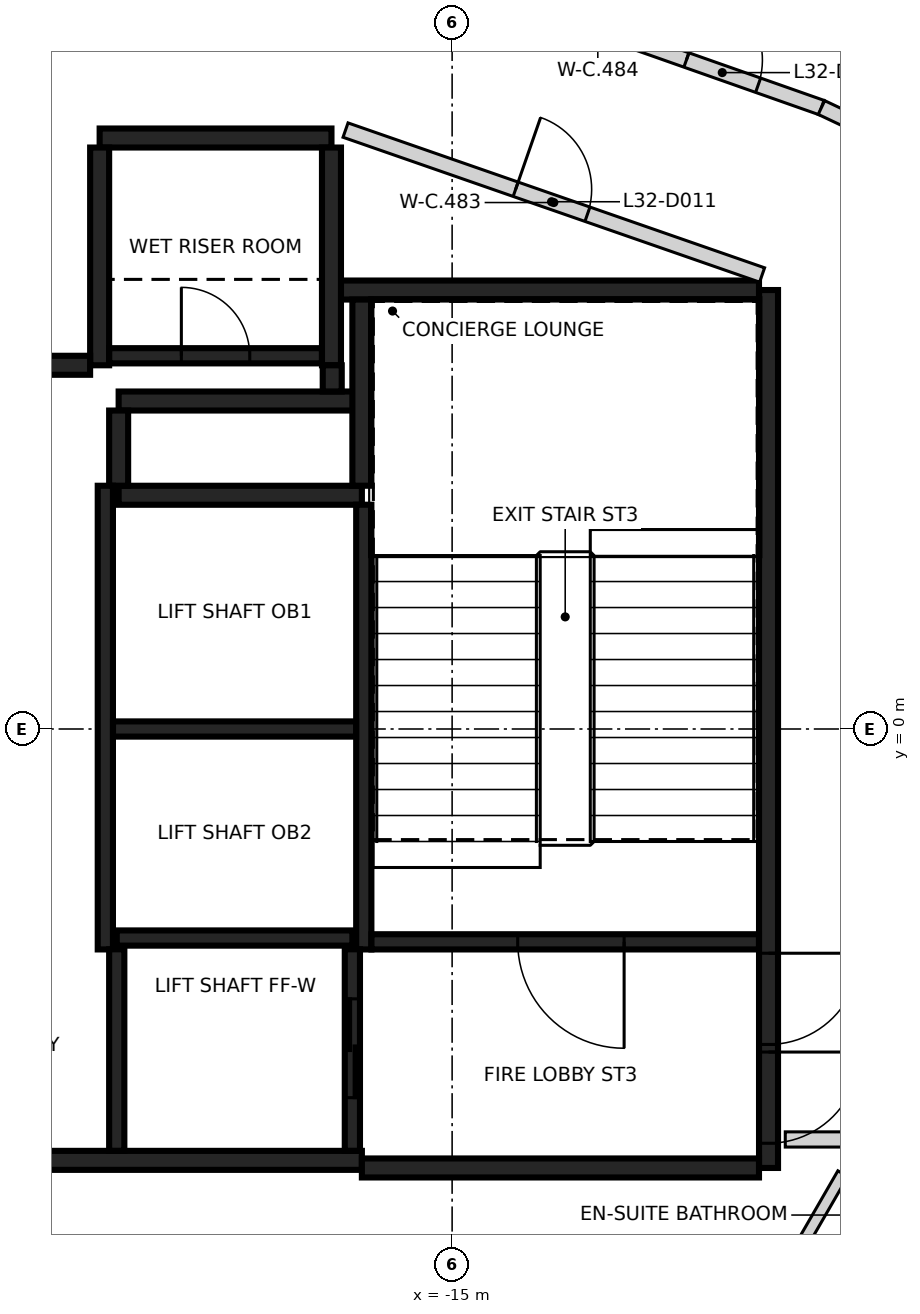
"""IFC4 building model, lengths in metres.
Left out: names, types, materials, properties, quantities, classifications, styles, units other than length and angle.
Written with IfcOpenShell. Run it as: python <this file> out.ifc"""

import sys

from ifc_helpers import new_model, si_unit, direction, frame, frame_2d, origin, place, context, subcontext, project, spatial, rectangle, extrude, element, fill, save


model = new_model("IFC4")
c1 = context("Model", 3, precision=1e-05, world=origin(), true_north=direction((0.0, 1.0)))
c2 = subcontext(c1, "Body", "Model", "MODEL_VIEW")
j1 = project(units=[si_unit("LENGTHUNIT", "METRE"), si_unit("PLANEANGLEUNIT", "RADIAN")], contexts=[c1])
p1 = place(None, origin())
s1 = spatial("IfcSite", under=j1, at=p1, CompositionType="ELEMENT")
p2 = place(p1, origin())
s2 = spatial("IfcBuilding", under=s1, at=p2, CompositionType="ELEMENT")
p3 = place(p2, frame((0.0, 0.0, 132.4)))
s3 = spatial("IfcBuildingStorey", under=s2, at=p3, CompositionType="ELEMENT", Elevation=132.4)
p4 = place(p3, frame((-10.837, 5.775, 0.0), z_axis=(0.0, 0.0, 1.0), x_axis=(0.0, -1.0, 0.0)))
e1 = element("IfcWall", 1, at=p4, inside=s3, PredefinedType="SHEAR", context=c2, shape_type="SweptSolid", body=[
    extrude(rectangle(XDim=11.55, YDim=0.25, at=frame_2d((5.775, 0.0))), origin(), (0.0, 0.0, 1.0), 3.2),
])
p5 = place(p4, frame((10.025, 0.0, 0.0)))
e2 = element("IfcOpeningElement", 2, at=p5, cuts=e1, PredefinedType="OPENING", context=c2, shape_type="SweptSolid", body=[
    extrude(rectangle(XDim=1.2, YDim=2.1, at=frame_2d((0.6, 1.05))), frame((0.0, 0.135, 0.0), z_axis=(0.0, -1.0, 0.0), x_axis=(1.0, 0.0, 0.0)), (0.0, 0.0, 1.0), 0.27),
])
p6 = place(p4, frame((8.725, 0.0, 0.0)))
e3 = element("IfcOpeningElement", 3, at=p6, cuts=e1, PredefinedType="OPENING", context=c2, shape_type="SweptSolid", body=[
    extrude(rectangle(XDim=1.2, YDim=2.1, at=frame_2d((0.6, 1.05))), frame((0.0, 0.135, 0.0), z_axis=(0.0, -1.0, 0.0), x_axis=(1.0, 0.0, 0.0)), (0.0, 0.0, 1.0), 0.27),
])
p7 = place(p3, frame((-16.187, -5.675, 0.0), z_axis=(0.0, 0.0, 1.0), x_axis=(-1.0, 0.0, 0.0)))
e4 = element("IfcWall", 4, at=p7, inside=s3, PredefinedType="SHEAR", context=c2, shape_type="SweptSolid", body=[
    extrude(rectangle(XDim=6.25, YDim=0.25, at=frame_2d((3.125, 0.0))), origin(), (0.0, 0.0, 1.0), 3.2),
])
p8 = place(p3, frame((-10.963, -5.775, 0.0), z_axis=(0.0, 0.0, 1.0), x_axis=(-1.0, 0.0, 0.0)))
e5 = element("IfcWall", 5, at=p8, inside=s3, PredefinedType="SHEAR", context=c2, shape_type="SweptSolid", body=[
    extrude(rectangle(XDim=5.225, YDim=0.25, at=frame_2d((2.612, 0.0))), origin(), (0.0, 0.0, 1.0), 3.2),
])
p9 = place(p3, frame((-16.472, 5.775, 0.0), z_axis=(0.0, 0.0, 1.0), x_axis=(1.0, 0.0, 0.0)))
e6 = element("IfcWall", 6, at=p9, inside=s3, PredefinedType="SHEAR", context=c2, shape_type="SweptSolid", body=[
    extrude(rectangle(XDim=5.51, YDim=0.25, at=frame_2d((2.755, 0.0))), origin(), (0.0, 0.0, 1.0), 3.2),
])
p10 = place(p3, frame((-19.387, 3.075, 0.0), z_axis=(0.0, 0.0, 1.0), x_axis=(1.0, 0.0, 0.0)))
e7 = element("IfcWall", 7, at=p10, inside=s3, PredefinedType="SHEAR", context=c2, shape_type="SweptSolid", body=[
    extrude(rectangle(XDim=3.2, YDim=0.25, at=frame_2d((1.6, 0.0))), origin(), (0.0, 0.0, 1.0), 3.2),
])
p11 = place(p3, frame((-19.637, 7.775, 0.0), z_axis=(0.0, 0.0, 1.0), x_axis=(1.0, 0.0, 0.0)))
e8 = element("IfcWall", 8, at=p11, inside=s3, PredefinedType="SHEAR", context=c2, shape_type="SweptSolid", body=[
    extrude(rectangle(XDim=3.05, YDim=0.25, at=frame_2d((1.525, 0.0))), origin(), (0.0, 0.0, 1.0), 3.2),
])
for number, where, z_axis, x_axis in (
    (9, (-16.587, 7.65, 0.0), (0.0, 0.0, 1.0), (0.0, -1.0, 0.0)),
    (10, (-19.637, 4.785, 0.0), (0.0, 0.0, 1.0), (0.0, 1.0, 0.0)),
):
    element("IfcWall", number, at=place(p3, frame(where, z_axis=z_axis, x_axis=x_axis)), inside=s3, PredefinedType="SHEAR", context=c2, shape_type="SweptSolid", body=[
        extrude(rectangle(XDim=2.865, YDim=0.25, at=frame_2d((1.432, 0.0))), origin(), (0.0, 0.0, 1.0), 3.2),
    ])
p12 = place(p3, frame((-16.302, 4.315, 0.0), z_axis=(0.0, 0.0, 1.0), x_axis=(-1.0, 0.0, 0.0)))
e11 = element("IfcWall", 11, at=p12, inside=s3, PredefinedType="SHEAR", context=c2, shape_type="SweptSolid", body=[
    extrude(rectangle(XDim=3.085, YDim=0.25, at=frame_2d((1.542, 0.0))), origin(), (0.0, 0.0, 1.0), 3.2),
])
p13 = place(p3, frame((-16.187, 3.2, 0.0), z_axis=(0.0, 0.0, 1.0), x_axis=(0.0, 1.0, 0.0)))
e12 = element("IfcWall", 12, at=p13, inside=s3, PredefinedType="SHEAR", context=c2, shape_type="SweptSolid", body=[
    extrude(rectangle(XDim=2.449, YDim=0.25, at=frame_2d((1.225, 0.0))), origin(), (0.0, 0.0, 1.0), 3.2),
])
p14 = place(p3, frame((-19.387, 4.19, 0.0), z_axis=(0.0, 0.0, 1.0), x_axis=(0.0, -1.0, 0.0)))
e13 = element("IfcWall", 13, at=p14, inside=s3, PredefinedType="SHEAR", context=c2, shape_type="SweptSolid", body=[
    extrude(rectangle(XDim=0.989, YDim=0.25, at=frame_2d((0.495, 0.0))), origin(), (0.0, 0.0, 1.0), 3.2),
])
p15 = place(p3, frame((-20.447, 4.785, 0.0), z_axis=(0.0, 0.0, 1.0), x_axis=(1.0, 0.0, 0.0)))
e14 = element("IfcWall", 14, at=p15, inside=s3, PredefinedType="SHEAR", context=c2, shape_type="SweptSolid", body=[
    extrude(rectangle(XDim=0.685, YDim=0.25, at=frame_2d((0.342, 0.0))), origin(), (0.0, 0.0, 1.0), 3.2),
])
p16 = place(p3, frame((-16.577, 4.785, 0.0), z_axis=(0.0, 0.0, 1.0), x_axis=(0.0, -1.0, 0.0)))
e15 = element("IfcWall", 15, at=p16, inside=s3, PredefinedType="SHEAR", context=c2, shape_type="SweptSolid", body=[
    extrude(rectangle(XDim=0.344, YDim=0.25, at=frame_2d((0.172, 0.0))), origin(), (0.0, 0.0, 1.0), 3.2),
])
p17 = place(p3, frame((-16.162, 2.951, 0.0), z_axis=(0.0, 0.0, 1.0), x_axis=(0.0, -1.0, 0.0)))
e16 = element("IfcWall", 16, at=p17, inside=s3, PredefinedType="SHEAR", context=c2, shape_type="SweptSolid", body=[
    extrude(rectangle(XDim=5.851, YDim=0.2, at=frame_2d((2.925, 0.0))), origin(), (0.0, 0.0, 1.0), 3.2),
])
p18 = place(p3, frame((-19.562, -2.9, 0.0), z_axis=(0.0, 0.0, 1.0), x_axis=(0.0, 1.0, 0.0)))
e17 = element("IfcWall", 17, at=p18, inside=s3, PredefinedType="SHEAR", context=c2, shape_type="SweptSolid", body=[
    extrude(rectangle(XDim=6.1, YDim=0.2, at=frame_2d((3.05, 0.0))), origin(), (0.0, 0.0, 1.0), 3.2),
])
p19 = place(p3, frame((-10.963, -2.8, 0.0), z_axis=(0.0, 0.0, 1.0), x_axis=(-1.0, 0.0, 0.0)))
e18 = element("IfcWall", 18, at=p19, inside=s3, PredefinedType="SHEAR", context=c2, shape_type="SweptSolid", body=[
    extrude(rectangle(XDim=5.098, YDim=0.2, at=frame_2d((2.549, 0.0))), origin(), (0.0, 0.0, 1.0), 3.2),
])
p20 = place(p19, frame((1.774, 0.0, 0.0)))
e19 = element("IfcOpeningElement", 19, at=p20, cuts=e18, PredefinedType="OPENING", context=c2, shape_type="SweptSolid", body=[
    extrude(rectangle(XDim=1.4, YDim=2.1, at=frame_2d((0.7, 1.05))), frame((0.0, 0.11, 0.0), z_axis=(0.0, -1.0, 0.0), x_axis=(1.0, 0.0, 0.0)), (0.0, 0.0, 1.0), 0.22),
])
p21 = place(p3, frame((-16.263, 0.0, 0.0), z_axis=(0.0, 0.0, 1.0), x_axis=(-1.0, 0.0, 0.0)))
e20 = element("IfcWall", 20, at=p21, inside=s3, PredefinedType="SHEAR", context=c2, shape_type="SweptSolid", body=[
    extrude(rectangle(XDim=3.198, YDim=0.2, at=frame_2d((1.599, 0.0))), origin(), (0.0, 0.0, 1.0), 3.2),
])
p22 = place(p3, frame((-19.511, 4.91, 0.0), z_axis=(0.0, 0.0, 1.0), x_axis=(1.0, 0.0, 0.0)))
e21 = element("IfcWall", 21, at=p22, inside=s3, PredefinedType="SHEAR", context=c2, shape_type="SweptSolid", body=[
    extrude(rectangle(XDim=2.798, YDim=0.2, at=frame_2d((1.399, 0.0))), origin(), (0.0, 0.0, 1.0), 3.2),
])
p23 = place(p22, frame((0.949, 0.0, 0.0)))
e22 = element("IfcOpeningElement", 22, at=p23, cuts=e21, PredefinedType="OPENING", context=c2, shape_type="SweptSolid", body=[
    extrude(rectangle(XDim=0.9, YDim=2.1, at=frame_2d((0.45, 1.05))), frame((0.0, 0.11, 0.0), z_axis=(0.0, -1.0, 0.0), x_axis=(1.0, 0.0, 0.0)), (0.0, 0.0, 1.0), 0.22),
])
p24 = place(p3, frame((-19.412, -2.75, 0.0), z_axis=(0.0, 0.0, 1.0), x_axis=(1.0, 0.0, 0.0)))
e23 = element("IfcWall", 23, at=p24, inside=s3, PredefinedType="SHEAR", context=c2, shape_type="SweptSolid", body=[
    extrude(rectangle(XDim=3.1, YDim=0.2, at=frame_2d((1.55, 0.0))), origin(), (0.0, 0.0, 1.0), 3.2),
])
p25 = place(p3, frame((-16.312, -2.898, 0.0), z_axis=(0.0, 0.0, 1.0), x_axis=(0.0, -1.0, 0.0)))
e24 = element("IfcWall", 24, at=p25, inside=s3, PredefinedType="SHEAR", context=c2, shape_type="SweptSolid", body=[
    extrude(rectangle(XDim=2.651, YDim=0.2, at=frame_2d((1.325, 0.0))), origin(), (0.0, 0.0, 1.0), 3.2),
])
p26 = place(p25, frame((0.652, 0.0, 0.0)))
e25 = element("IfcOpeningElement", 25, at=p26, cuts=e24, PredefinedType="OPENING", context=c2, shape_type="SweptSolid", body=[
    extrude(rectangle(XDim=1.3, YDim=2.1, at=frame_2d((0.65, 1.05))), frame((0.0, 0.11, 0.0), z_axis=(0.0, -1.0, 0.0), x_axis=(1.0, 0.0, 0.0)), (0.0, 0.0, 1.0), 0.22),
])
p27 = place(p3, frame((-19.412, -5.549, 0.0), z_axis=(0.0, 0.0, 1.0), x_axis=(0.0, 1.0, 0.0)))
e26 = element("IfcWall", 26, at=p27, inside=s3, PredefinedType="SHEAR", context=c2, shape_type="SweptSolid", body=[
    extrude(rectangle(XDim=2.651, YDim=0.2, at=frame_2d((1.325, 0.0))), origin(), (0.0, 0.0, 1.0), 3.2),
])
p28 = place(p3, frame((-16.402, 7.879, 0.0), z_axis=(0.0, 0.0, 1.0), x_axis=(0.944492255471, -0.328533680702, 0.0)))
e27 = element("IfcWall", 27, at=p28, inside=s3, PredefinedType="PARTITIONING", context=c2, shape_type="SweptSolid", body=[
    extrude(rectangle(XDim=5.802, YDim=0.2, at=frame_2d((2.901, 0.0))), origin(), (0.0, 0.0, 1.0), 3.2),
])
p29 = place(p28, frame((2.37, 0.0, 0.0)))
e28 = element("IfcOpeningElement", 28, at=p29, cuts=e27, PredefinedType="OPENING", context=c2, shape_type="SweptSolid", body=[
    extrude(rectangle(XDim=1.0, YDim=2.1, at=frame_2d((0.5, 1.05))), frame((0.0, 0.11, 0.0), z_axis=(0.0, -1.0, 0.0), x_axis=(1.0, 0.0, 0.0)), (0.0, 0.0, 1.0), 0.22),
])
p30 = place(p3, frame((-16.026, 10.248, 0.0), z_axis=(0.0, 0.0, 1.0), x_axis=(0.943234993827, -0.332126100179, 0.0)))
e29 = element("IfcWall", 29, at=p30, inside=s3, PredefinedType="PARTITIONING", context=c2, shape_type="SweptSolid", body=[
    extrude(rectangle(XDim=6.239, YDim=0.2, at=frame_2d((3.119, 0.0))), origin(), (0.0, 0.0, 1.0), 3.2),
])
p31 = place(p30, frame((4.355, 0.0, 0.0)))
e30 = element("IfcOpeningElement", 30, at=p31, cuts=e29, PredefinedType="OPENING", context=c2, shape_type="SweptSolid", body=[
    extrude(rectangle(XDim=1.0, YDim=2.1, at=frame_2d((0.5, 1.05))), frame((0.0, 0.11, 0.0), z_axis=(0.0, -1.0, 0.0), x_axis=(1.0, 0.0, 0.0)), (0.0, 0.0, 1.0), 0.22),
])
p32 = place(p30, frame((1.251, 0.0, 0.0)))
e31 = element("IfcOpeningElement", 31, at=p32, cuts=e29, PredefinedType="OPENING", context=c2, shape_type="SweptSolid", body=[
    extrude(rectangle(XDim=1.0, YDim=2.1, at=frame_2d((0.5, 1.05))), frame((0.0, 0.11, 0.0), z_axis=(0.0, -1.0, 0.0), x_axis=(1.0, 0.0, 0.0)), (0.0, 0.0, 1.0), 0.22),
])
p33 = place(p3, frame((-10.617, -5.4, 0.0), z_axis=(0.0, 0.0, 1.0), x_axis=(1.0, 0.0, 0.0)))
e32 = element("IfcWall", 32, at=p33, inside=s3, PredefinedType="PARTITIONING", context=c2, shape_type="SweptSolid", body=[
    extrude(rectangle(XDim=1.355, YDim=0.2, at=frame_2d((0.677, 0.0))), origin(), (0.0, 0.0, 1.0), 3.2),
])
p34 = place(p3, frame((-10.141, 8.176, 0.0), z_axis=(0.0, 0.0, 1.0), x_axis=(0.903904169039, -0.427735026849, 0.0)))
e33 = element("IfcWall", 33, at=p34, inside=s3, PredefinedType="PARTITIONING", context=c2, shape_type="SweptSolid", body=[
    extrude(rectangle(XDim=1.225, YDim=0.2, at=frame_2d((0.612, 0.0))), origin(), (0.0, 0.0, 1.0), 3.2),
])
p35 = place(p3, frame((-12.279, 16.946, 0.0), z_axis=(0.0, 0.0, 1.0), x_axis=(0.499902454835, -0.866081714187, 0.0)))
e34 = element("IfcWall", 34, at=p35, inside=s3, PredefinedType="PARTITIONING", context=c2, shape_type="SweptSolid", body=[
    extrude(rectangle(XDim=12.015, YDim=0.2, at=frame_2d((6.008, 0.0))), origin(), (0.0, 0.0, 1.0), 3.2),
])
p36 = place(p3, frame((-12.278, -16.946, 0.0), z_axis=(0.0, 0.0, 1.0), x_axis=(0.499887212932, 0.866090511637, 0.0)))
e35 = element("IfcWall", 35, at=p36, inside=s3, PredefinedType="PARTITIONING", context=c2, shape_type="SweptSolid", body=[
    extrude(rectangle(XDim=12.015, YDim=0.2, at=frame_2d((6.007, 0.0))), origin(), (0.0, 0.0, 1.0), 3.2),
])
p37 = place(p3, frame((-10.511, -6.977, 0.0), z_axis=(0.0, 0.0, 1.0), x_axis=(0.500274472704, 0.865866878891, 0.0)))
e36 = element("IfcWall", 36, at=p37, inside=s3, PredefinedType="PARTITIONING", context=c2, shape_type="SweptSolid", body=[
    extrude(rectangle(XDim=1.302, YDim=0.15, at=frame_2d((0.651, 0.0))), origin(), (0.0, 0.0, 1.0), 3.2),
])
p38 = place(p26, origin())
e37 = element("IfcDoor", 37, at=p38, inside=s3, OperationType="SLIDING_TO_RIGHT", PredefinedType="DOOR", context=c2, shape_type="SweptSolid", body=[
    extrude(rectangle(XDim=1.3, YDim=2.1, at=frame_2d((0.65, 1.05))), frame((0.0, 0.025, 0.0), z_axis=(0.0, -1.0, 0.0), x_axis=(1.0, 0.0, 0.0)), (0.0, 0.0, 1.0), 0.05),
])
fill(e25, e37)
p39 = place(p5, origin())
e38 = element("IfcDoor", 38, at=p39, inside=s3, OperationType="SINGLE_SWING_LEFT", PredefinedType="DOOR", context=c2, shape_type="SweptSolid", body=[
    extrude(rectangle(XDim=1.2, YDim=2.1, at=frame_2d((0.6, 1.05))), frame((0.0, 0.025, 0.0), z_axis=(0.0, -1.0, 0.0), x_axis=(1.0, 0.0, 0.0)), (0.0, 0.0, 1.0), 0.05),
])
fill(e2, e38)
p40 = place(p6, origin())
e39 = element("IfcDoor", 39, at=p40, inside=s3, OperationType="SINGLE_SWING_RIGHT", PredefinedType="DOOR", context=c2, shape_type="SweptSolid", body=[
    extrude(rectangle(XDim=1.2, YDim=2.1, at=frame_2d((0.6, 1.05))), frame((0.0, 0.025, 0.0), z_axis=(0.0, -1.0, 0.0), x_axis=(1.0, 0.0, 0.0)), (0.0, 0.0, 1.0), 0.05),
])
fill(e3, e39)
p41 = place(p20, origin())
e40 = element("IfcDoor", 40, at=p41, inside=s3, OperationType="SINGLE_SWING_RIGHT", PredefinedType="DOOR", context=c2, shape_type="SweptSolid", body=[
    extrude(rectangle(XDim=1.4, YDim=2.1, at=frame_2d((0.7, 1.05))), frame((0.0, 0.025, 0.0), z_axis=(0.0, -1.0, 0.0), x_axis=(1.0, 0.0, 0.0)), (0.0, 0.0, 1.0), 0.05),
])
fill(e19, e40)
p42 = place(p23, origin())
e41 = element("IfcDoor", 41, at=p42, inside=s3, OperationType="SINGLE_SWING_LEFT", PredefinedType="DOOR", context=c2, shape_type="SweptSolid", body=[
    extrude(rectangle(XDim=0.9, YDim=2.1, at=frame_2d((0.45, 1.05))), frame((0.0, 0.025, 0.0), z_axis=(0.0, -1.0, 0.0), x_axis=(1.0, 0.0, 0.0)), (0.0, 0.0, 1.0), 0.05),
])
fill(e22, e41)
p43 = place(p31, origin())
e42 = element("IfcDoor", 42, at=p43, inside=s3, OperationType="SINGLE_SWING_LEFT", PredefinedType="DOOR", context=c2, shape_type="SweptSolid", body=[
    extrude(rectangle(XDim=1.0, YDim=2.1, at=frame_2d((0.5, 1.05))), frame((0.0, 0.025, 0.0), z_axis=(0.0, -1.0, 0.0), x_axis=(1.0, 0.0, 0.0)), (0.0, 0.0, 1.0), 0.05),
])
fill(e30, e42)
p44 = place(p29, frame((1.0, 0.0, 0.0), z_axis=(0.0, 0.0, 1.0), x_axis=(-1.0, 0.0, 0.0)))
e43 = element("IfcDoor", 43, at=p44, inside=s3, OperationType="SINGLE_SWING_LEFT", PredefinedType="DOOR", context=c2, shape_type="SweptSolid", body=[
    extrude(rectangle(XDim=1.0, YDim=2.1, at=frame_2d((0.5, 1.05))), frame((0.0, 0.025, 0.0), z_axis=(0.0, -1.0, 0.0), x_axis=(1.0, 0.0, 0.0)), (0.0, 0.0, 1.0), 0.05),
])
fill(e28, e43)
save(model, sys.argv[1])
